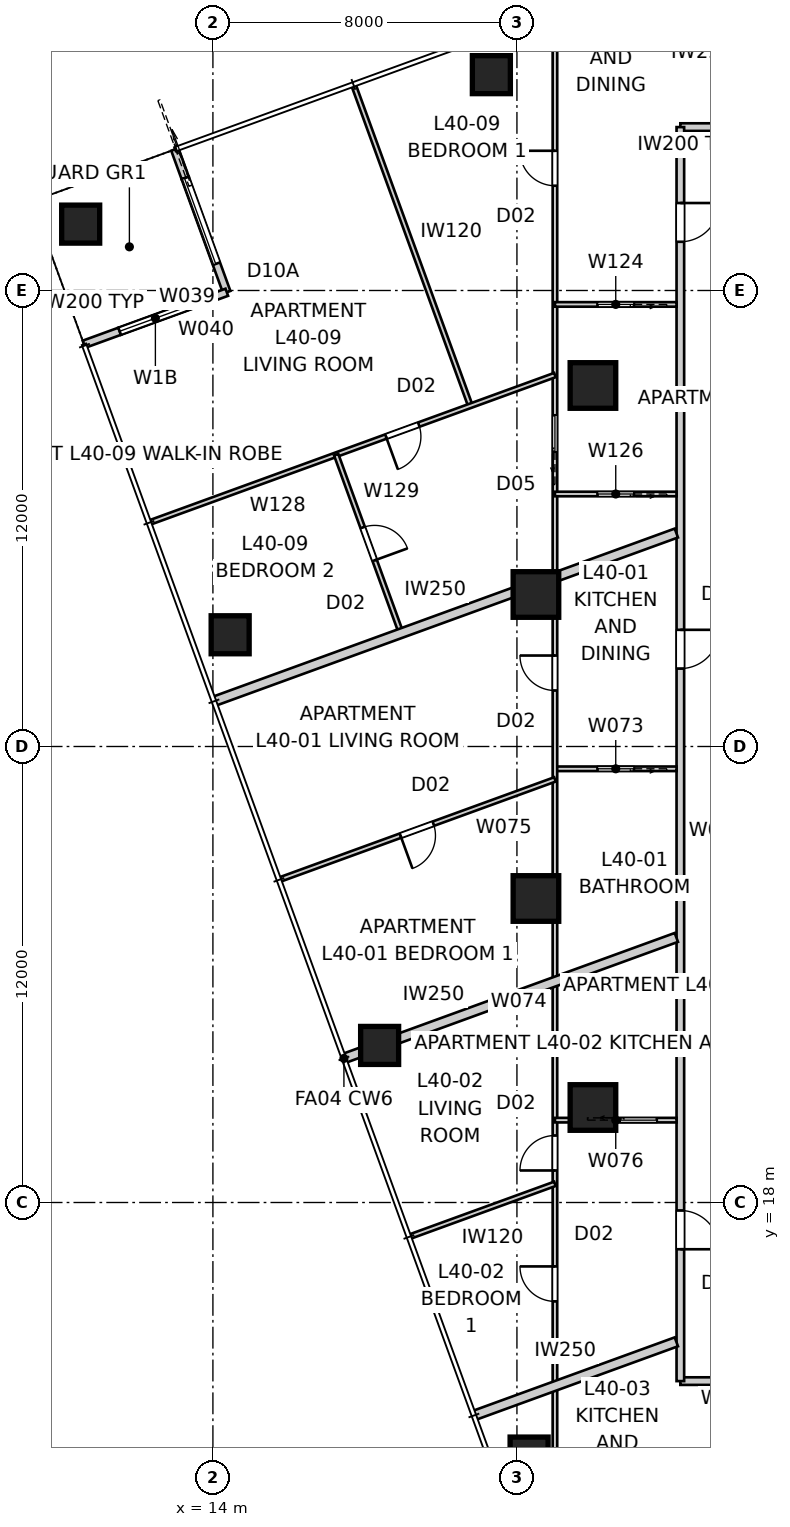
"""IFC4 building model, lengths in metres.
Left out: names, types, materials, properties, quantities, classifications, styles, units other than length and angle.
Written with IfcOpenShell. Run it as: python <this file> out.ifc"""

import sys

from ifc_helpers import new_model, si_unit, direction, frame, frame_2d, origin, origin_2d, place, context, subcontext, project, spatial, rectangle, extrude, element, fill, save


model = new_model("IFC4")
c1 = context("Model", 3, precision=1e-05, world=origin(), true_north=direction((0.0, 1.0)))
c2 = subcontext(c1, "Body", "Model", "MODEL_VIEW")
j1 = project(units=[si_unit("LENGTHUNIT", "METRE"), si_unit("PLANEANGLEUNIT", "RADIAN")], contexts=[c1])
p1 = place(None, origin())
s1 = spatial("IfcSite", under=j1, at=p1, CompositionType="ELEMENT")
p2 = place(p1, origin())
s2 = spatial("IfcBuilding", under=s1, at=p2, CompositionType="ELEMENT")
p3 = place(p2, frame((0.0, 0.0, 147.2)))
s3 = spatial("IfcBuildingStorey", under=s2, at=p3, CompositionType="ELEMENT", Elevation=147.2)
for number, where, z_axis, x_axis in (
    (1, (21.327, 47.68, 0.0), (0.0, 0.0, 1.0), (1.0, 0.0, 0.0)),
    (2, (10.521, 43.747, 0.0), (0.0, 0.0, 1.0), (1.0, 0.0, 0.0)),
    (3, (14.454, 32.94, 0.0), (0.0, 0.0, 1.0), (1.0, 0.0, 0.0)),
    (4, (18.387, 22.134, 0.0), (0.0, 0.0, 1.0), (1.0, 0.0, 0.0)),
    (5, (22.32, 11.327, 0.0), (0.0, 0.0, 1.0), (1.0, 0.0, 0.0)),
):
    element("IfcColumn", number, at=place(p3, frame(where, z_axis=z_axis, x_axis=x_axis)), inside=s3, PredefinedType="COLUMN", context=c2, shape_type="SweptSolid", body=[
        extrude(rectangle(XDim=1.0, YDim=1.0, at=origin_2d()), origin(), (0.0, 0.0, 1.0), 3.4),
    ])
for number, where, z_axis, x_axis in (
    (6, (24.0, 39.5, 0.0), (0.0, 0.0, 1.0), (1.0, 0.0, 0.0)),
    (7, (22.5, 34.0, 0.0), (0.0, 0.0, 1.0), (1.0, 0.0, 0.0)),
    (8, (22.5, 26.0, 0.0), (0.0, 0.0, 1.0), (1.0, 0.0, 0.0)),
    (9, (24.0, 20.5, 0.0), (0.0, 0.0, 1.0), (1.0, 0.0, 0.0)),
):
    element("IfcColumn", number, at=place(p3, frame(where, z_axis=z_axis, x_axis=x_axis)), inside=s3, PredefinedType="COLUMN", context=c2, shape_type="SweptSolid", body=[
        extrude(rectangle(XDim=1.2, YDim=1.2, at=origin_2d()), origin(), (0.0, 0.0, 1.0), 3.4),
    ])
p4 = place(p3, frame((12.998, 45.712, 0.0), z_axis=(0.0, 0.0, 1.0), x_axis=(0.342110593602, -0.939659694648, 0.0)))
e10 = element("IfcWall", 10, at=p4, inside=s3, PredefinedType="SOLIDWALL", context=c2, shape_type="SweptSolid", body=[
    extrude(rectangle(XDim=0.8, YDim=0.2, at=frame_2d((0.4, 0.0))), origin(), (0.0, 0.0, 1.0), 3.25),
])
p5 = place(p3, frame((13.271, 44.96, 0.0), z_axis=(0.0, 0.0, 1.0), x_axis=(0.342018703306, -0.939693144909, 0.0)))
e11 = element("IfcWall", 11, at=p5, inside=s3, PredefinedType="SOLIDWALL", context=c2, shape_type="SweptSolid", body=[
    extrude(rectangle(XDim=3.2, YDim=0.2, at=frame_2d((1.6, 0.0))), origin(), (0.0, 0.0, 1.0), 2.722),
])
p6 = place(p5, origin())
e12 = element("IfcOpeningElement", 12, at=p6, cuts=e11, PredefinedType="OPENING", context=c2, shape_type="SweptSolid", body=[
    extrude(rectangle(XDim=2.4, YDim=2.1, at=frame_2d((1.2, 1.05))), frame((0.0, 0.11, 0.0), z_axis=(0.0, -1.0, 0.0), x_axis=(1.0, 0.0, 0.0)), (0.0, 0.0, 1.0), 0.22),
])
p7 = place(p3, frame((14.366, 41.953, 0.0), z_axis=(0.0, 0.0, 1.0), x_axis=(-0.939712609717, -0.341965219194, 0.0)))
e13 = element("IfcWall", 13, at=p7, inside=s3, PredefinedType="SOLIDWALL", context=c2, shape_type="SweptSolid", body=[
    extrude(rectangle(XDim=3.0, YDim=0.2, at=frame_2d((1.5, 0.0))), origin(), (0.0, 0.0, 1.0), 2.722),
])
p8 = place(p7, frame((1.0, 0.0, 0.45)))
e14 = element("IfcOpeningElement", 14, at=p8, cuts=e13, PredefinedType="OPENING", context=c2, shape_type="SweptSolid", body=[
    extrude(rectangle(XDim=2.0, YDim=1.8, at=frame_2d((1.0, 0.9))), frame((0.0, 0.11, 0.0), z_axis=(0.0, -1.0, 0.0), x_axis=(1.0, 0.0, 0.0)), (0.0, 0.0, 1.0), 0.22),
])
p9 = place(p3, frame((11.547, 40.927, 0.0), z_axis=(0.0, 0.0, 1.0), x_axis=(-0.939686455819, -0.342037080957, 0.0)))
e15 = element("IfcWall", 15, at=p9, inside=s3, PredefinedType="SOLIDWALL", context=c2, shape_type="SweptSolid", body=[
    extrude(rectangle(XDim=1.0, YDim=0.2, at=frame_2d((0.5, 0.0))), origin(), (0.0, 0.0, 1.0), 3.25),
])
p10 = place(p3, frame((26.3, 13.3, 0.0), z_axis=(0.0, 0.0, 1.0), x_axis=(1.0, 0.0, 0.0)))
e16 = element("IfcWall", 16, at=p10, inside=s3, PredefinedType="PARTITIONING", context=c2, shape_type="SweptSolid", body=[
    extrude(rectangle(XDim=5.925, YDim=0.2, at=frame_2d((2.962, 0.0))), origin(), (0.0, 0.0, 1.0), 3.25),
])
p11 = place(p10, frame((2.545, 0.0, 0.0)))
e17 = element("IfcOpeningElement", 17, at=p11, cuts=e16, PredefinedType="OPENING", context=c2, shape_type="SweptSolid", body=[
    extrude(rectangle(XDim=1.02, YDim=2.34, at=frame_2d((0.51, 1.17))), frame((0.0, 0.11, 0.0), z_axis=(0.0, -1.0, 0.0), x_axis=(1.0, 0.0, 0.0)), (0.0, 0.0, 1.0), 0.22),
])
p12 = place(p3, frame((30.758, 46.3, 0.0), z_axis=(0.0, 0.0, 1.0), x_axis=(-1.0, 0.0, 0.0)))
e18 = element("IfcWall", 18, at=p12, inside=s3, PredefinedType="PARTITIONING", context=c2, shape_type="SweptSolid", body=[
    extrude(rectangle(XDim=4.458, YDim=0.2, at=frame_2d((2.229, 0.0))), origin(), (0.0, 0.0, 1.0), 3.25),
])
p13 = place(p3, frame((26.3, 46.3, 0.0), z_axis=(0.0, 0.0, 1.0), x_axis=(0.0, -1.0, 0.0)))
e19 = element("IfcWall", 19, at=p13, inside=s3, PredefinedType="PARTITIONING", context=c2, shape_type="SweptSolid", body=[
    extrude(rectangle(XDim=33.0, YDim=0.2, at=frame_2d((16.5, 0.0))), origin(), (0.0, 0.0, 1.0), 3.25),
])
p14 = place(p13, frame((13.229, 0.0, 0.0)))
e20 = element("IfcOpeningElement", 20, at=p14, cuts=e19, PredefinedType="OPENING", context=c2, shape_type="SweptSolid", body=[
    extrude(rectangle(XDim=1.02, YDim=2.34, at=frame_2d((0.51, 1.17))), frame((0.0, 0.11, 0.0), z_axis=(0.0, -1.0, 0.0), x_axis=(1.0, 0.0, 0.0)), (0.0, 0.0, 1.0), 0.22),
])
p15 = place(p13, frame((28.51, 0.0, 0.0)))
e21 = element("IfcOpeningElement", 21, at=p15, cuts=e19, PredefinedType="OPENING", context=c2, shape_type="SweptSolid", body=[
    extrude(rectangle(XDim=1.02, YDim=2.34, at=frame_2d((0.51, 1.17))), frame((0.0, 0.11, 0.0), z_axis=(0.0, -1.0, 0.0), x_axis=(1.0, 0.0, 0.0)), (0.0, 0.0, 1.0), 0.22),
])
p16 = place(p13, frame((1.998, 0.0, 0.0)))
e22 = element("IfcOpeningElement", 22, at=p16, cuts=e19, PredefinedType="OPENING", context=c2, shape_type="SweptSolid", body=[
    extrude(rectangle(XDim=1.02, YDim=2.34, at=frame_2d((0.51, 1.17))), frame((0.0, 0.11, 0.0), z_axis=(0.0, -1.0, 0.0), x_axis=(1.0, 0.0, 0.0)), (0.0, 0.0, 1.0), 0.22),
])
p17 = place(p3, frame((14.027, 31.188, 0.0), z_axis=(0.0, 0.0, 1.0), x_axis=(0.939692090592, 0.342021600019, 0.0)))
e23 = element("IfcWall", 23, at=p17, inside=s3, PredefinedType="PARTITIONING", context=c2, shape_type="SweptSolid", body=[
    extrude(rectangle(XDim=12.949, YDim=0.25, at=frame_2d((6.474, 0.0))), origin(), (0.0, 0.0, 1.0), 3.25),
])
p18 = place(p3, frame((17.447, 21.792, 0.0), z_axis=(0.0, 0.0, 1.0), x_axis=(0.939693071685, 0.342018904489, 0.0)))
e24 = element("IfcWall", 24, at=p18, inside=s3, PredefinedType="PARTITIONING", context=c2, shape_type="SweptSolid", body=[
    extrude(rectangle(XDim=9.309, YDim=0.25, at=frame_2d((4.654, 0.0))), origin(), (0.0, 0.0, 1.0), 3.25),
])
p19 = place(p3, frame((20.868, 12.395, 0.0), z_axis=(0.0, 0.0, 1.0), x_axis=(0.939690274876, 0.342026588591, 0.0)))
e25 = element("IfcWall", 25, at=p19, inside=s3, PredefinedType="PARTITIONING", context=c2, shape_type="SweptSolid", body=[
    extrude(rectangle(XDim=5.669, YDim=0.25, at=frame_2d((2.834, 0.0))), origin(), (0.0, 0.0, 1.0), 3.25),
])
p20 = place(p3, frame((27.093, 50.843, 0.0), z_axis=(0.0, 0.0, 1.0), x_axis=(0.342012883883, -0.939695262975, 0.0)))
e26 = element("IfcWall", 26, at=p20, inside=s3, PredefinedType="PARTITIONING", context=c2, shape_type="SweptSolid", body=[
    extrude(rectangle(XDim=4.722, YDim=0.25, at=frame_2d((2.361, 0.0))), origin(), (0.0, 0.0, 1.0), 3.25),
])
p21 = place(p3, frame((26.2, 29.413, 0.0), z_axis=(0.0, 0.0, 1.0), x_axis=(-1.0, 0.0, 0.0)))
e27 = element("IfcWall", 27, at=p21, inside=s3, PredefinedType="PARTITIONING", context=c2, shape_type="SweptSolid", body=[
    extrude(rectangle(XDim=3.2, YDim=0.12, at=frame_2d((1.6, 0.0))), origin(), (0.0, 0.0, 1.0), 3.25),
])
p22 = place(p21, frame((1.12, 0.0, 0.0)))
e28 = element("IfcOpeningElement", 28, at=p22, cuts=e27, PredefinedType="OPENING", context=c2, shape_type="SweptSolid", body=[
    extrude(rectangle(XDim=0.96, YDim=2.1, at=frame_2d((0.48, 1.05))), frame((0.0, 0.07, 0.0), z_axis=(0.0, -1.0, 0.0), x_axis=(1.0, 0.0, 0.0)), (0.0, 0.0, 1.0), 0.14),
])
p23 = place(p3, frame((23.0, 10.8, 0.0), z_axis=(0.0, 0.0, 1.0), x_axis=(0.0, 1.0, 0.0)))
e29 = element("IfcWall", 29, at=p23, inside=s3, PredefinedType="PARTITIONING", context=c2, shape_type="SweptSolid", body=[
    extrude(rectangle(XDim=38.0, YDim=0.12, at=frame_2d((19.0, 0.0))), origin(), (0.0, 0.0, 1.0), 2.55),
])
p24 = place(p23, frame((20.674, 0.0, 0.0)))
e30 = element("IfcOpeningElement", 30, at=p24, cuts=e29, PredefinedType="OPENING", context=c2, shape_type="SweptSolid", body=[
    extrude(rectangle(XDim=0.92, YDim=2.34, at=frame_2d((0.46, 1.17))), frame((0.0, 0.07, 0.0), z_axis=(0.0, -1.0, 0.0), x_axis=(1.0, 0.0, 0.0)), (0.0, 0.0, 1.0), 0.14),
])
p25 = place(p23, frame((4.598, 0.0, 0.0)))
e31 = element("IfcOpeningElement", 31, at=p25, cuts=e29, PredefinedType="OPENING", context=c2, shape_type="SweptSolid", body=[
    extrude(rectangle(XDim=0.92, YDim=2.34, at=frame_2d((0.46, 1.17))), frame((0.0, 0.07, 0.0), z_axis=(0.0, -1.0, 0.0), x_axis=(1.0, 0.0, 0.0)), (0.0, 0.0, 1.0), 0.14),
])
p26 = place(p23, frame((8.043, 0.0, 0.0)))
e32 = element("IfcOpeningElement", 32, at=p26, cuts=e29, PredefinedType="OPENING", context=c2, shape_type="SweptSolid", body=[
    extrude(rectangle(XDim=0.92, YDim=2.34, at=frame_2d((0.46, 1.17))), frame((0.0, 0.07, 0.0), z_axis=(0.0, -1.0, 0.0), x_axis=(1.0, 0.0, 0.0)), (0.0, 0.0, 1.0), 0.14),
])
p27 = place(p23, frame((33.957, 0.0, 0.0)))
e33 = element("IfcOpeningElement", 33, at=p27, cuts=e29, PredefinedType="OPENING", context=c2, shape_type="SweptSolid", body=[
    extrude(rectangle(XDim=0.92, YDim=2.34, at=frame_2d((0.46, 1.17))), frame((0.0, 0.07, 0.0), z_axis=(0.0, -1.0, 0.0), x_axis=(1.0, 0.0, 0.0)), (0.0, 0.0, 1.0), 0.14),
])
p28 = place(p23, frame((26.957, 0.0, 0.0)))
e34 = element("IfcOpeningElement", 34, at=p28, cuts=e29, PredefinedType="OPENING", context=c2, shape_type="SweptSolid", body=[
    extrude(rectangle(XDim=0.96, YDim=2.1, at=frame_2d((0.48, 1.05))), frame((0.0, 0.07, 0.0), z_axis=(0.0, -1.0, 0.0), x_axis=(1.0, 0.0, 0.0)), (0.0, 0.0, 1.0), 0.14),
])
p29 = place(p3, frame((23.0, 29.134, 0.0), z_axis=(0.0, 0.0, 1.0), x_axis=(-0.939685835373, -0.342038785519, 0.0)))
e35 = element("IfcWall", 35, at=p29, inside=s3, PredefinedType="PARTITIONING", context=c2, shape_type="SweptSolid", body=[
    extrude(rectangle(XDim=7.689, YDim=0.12, at=frame_2d((3.844, 0.0))), origin(), (0.0, 0.0, 1.0), 3.25),
])
p30 = place(p29, frame((3.404, 0.0, 0.0)))
e36 = element("IfcOpeningElement", 36, at=p30, cuts=e35, PredefinedType="OPENING", context=c2, shape_type="SweptSolid", body=[
    extrude(rectangle(XDim=0.92, YDim=2.34, at=frame_2d((0.46, 1.17))), frame((0.0, 0.07, 0.0), z_axis=(0.0, -1.0, 0.0), x_axis=(1.0, 0.0, 0.0)), (0.0, 0.0, 1.0), 0.14),
])
p31 = place(p3, frame((23.0, 20.167, 0.0), z_axis=(0.0, 0.0, 1.0), x_axis=(1.0, 0.0, 0.0)))
e37 = element("IfcWall", 37, at=p31, inside=s3, PredefinedType="PARTITIONING", context=c2, shape_type="SweptSolid", body=[
    extrude(rectangle(XDim=3.2, YDim=0.12, at=frame_2d((1.6, 0.0))), origin(), (0.0, 0.0, 1.0), 3.25),
])
p32 = place(p31, frame((1.72, 0.0, 0.0)))
e38 = element("IfcOpeningElement", 38, at=p32, cuts=e37, PredefinedType="OPENING", context=c2, shape_type="SweptSolid", body=[
    extrude(rectangle(XDim=0.96, YDim=2.1, at=frame_2d((0.48, 1.05))), frame((0.0, 0.07, 0.0), z_axis=(0.0, -1.0, 0.0), x_axis=(1.0, 0.0, 0.0)), (0.0, 0.0, 1.0), 0.14),
])
p33 = place(p3, frame((23.0, 18.492, 0.0), z_axis=(0.0, 0.0, 1.0), x_axis=(-0.939682468191, -0.342048036063, 0.0)))
e39 = element("IfcWall", 39, at=p33, inside=s3, PredefinedType="PARTITIONING", context=c2, shape_type="SweptSolid", body=[
    extrude(rectangle(XDim=4.049, YDim=0.12, at=frame_2d((2.024, 0.0))), origin(), (0.0, 0.0, 1.0), 3.25),
])
p34 = place(p3, frame((26.2, 41.634, 0.0), z_axis=(0.0, 0.0, 1.0), x_axis=(-1.0, 0.0, 0.0)))
e40 = element("IfcWall", 40, at=p34, inside=s3, PredefinedType="PARTITIONING", context=c2, shape_type="SweptSolid", body=[
    extrude(rectangle(XDim=3.2, YDim=0.12, at=frame_2d((1.6, 0.0))), origin(), (0.0, 0.0, 1.0), 3.25),
])
p35 = place(p34, frame((1.12, 0.0, 0.0)))
e41 = element("IfcOpeningElement", 41, at=p35, cuts=e40, PredefinedType="OPENING", context=c2, shape_type="SweptSolid", body=[
    extrude(rectangle(XDim=0.96, YDim=2.1, at=frame_2d((0.48, 1.05))), frame((0.0, 0.07, 0.0), z_axis=(0.0, -1.0, 0.0), x_axis=(1.0, 0.0, 0.0)), (0.0, 0.0, 1.0), 0.14),
])
p36 = place(p3, frame((26.2, 36.645, 0.0), z_axis=(0.0, 0.0, 1.0), x_axis=(-1.0, 0.0, 0.0)))
e42 = element("IfcWall", 42, at=p36, inside=s3, PredefinedType="PARTITIONING", context=c2, shape_type="SweptSolid", body=[
    extrude(rectangle(XDim=3.2, YDim=0.12, at=frame_2d((1.6, 0.0))), origin(), (0.0, 0.0, 1.0), 3.25),
])
p37 = place(p36, frame((1.12, 0.0, 0.0)))
e43 = element("IfcOpeningElement", 43, at=p37, cuts=e42, PredefinedType="OPENING", context=c2, shape_type="SweptSolid", body=[
    extrude(rectangle(XDim=0.96, YDim=2.1, at=frame_2d((0.48, 1.05))), frame((0.0, 0.07, 0.0), z_axis=(0.0, -1.0, 0.0), x_axis=(1.0, 0.0, 0.0)), (0.0, 0.0, 1.0), 0.14),
])
p38 = place(p3, frame((17.71, 47.385, 0.0), z_axis=(0.0, 0.0, 1.0), x_axis=(0.342038393654, -0.939685978009, 0.0)))
e44 = element("IfcWall", 44, at=p38, inside=s3, PredefinedType="PARTITIONING", context=c2, shape_type="SweptSolid", body=[
    extrude(rectangle(XDim=8.96, YDim=0.12, at=frame_2d((4.48, 0.0))), origin(), (0.0, 0.0, 1.0), 3.25),
])
p39 = place(p3, frame((23.0, 39.775, 0.0), z_axis=(0.0, 0.0, 1.0), x_axis=(-0.939693965364, -0.342016449105, 0.0)))
e45 = element("IfcWall", 45, at=p39, inside=s3, PredefinedType="PARTITIONING", context=c2, shape_type="SweptSolid", body=[
    extrude(rectangle(XDim=11.328, YDim=0.12, at=frame_2d((5.664, 0.0))), origin(), (0.0, 0.0, 1.0), 3.25),
])
p40 = place(p39, frame((3.812, 0.0, 0.0)))
e46 = element("IfcOpeningElement", 46, at=p40, cuts=e45, PredefinedType="OPENING", context=c2, shape_type="SweptSolid", body=[
    extrude(rectangle(XDim=0.92, YDim=2.34, at=frame_2d((0.46, 1.17))), frame((0.0, 0.07, 0.0), z_axis=(0.0, -1.0, 0.0), x_axis=(1.0, 0.0, 0.0)), (0.0, 0.0, 1.0), 0.14),
])
p41 = place(p3, frame((17.243, 37.68, 0.0), z_axis=(0.0, 0.0, 1.0), x_axis=(0.341993964619, -0.939702148643, 0.0)))
e47 = element("IfcWall", 47, at=p41, inside=s3, PredefinedType="PARTITIONING", context=c2, shape_type="SweptSolid", body=[
    extrude(rectangle(XDim=5.0, YDim=0.12, at=frame_2d((2.5, 0.0))), origin(), (0.0, 0.0, 1.0), 3.25),
])
p42 = place(p41, frame((2.04, 0.0, 0.0)))
e48 = element("IfcOpeningElement", 48, at=p42, cuts=e47, PredefinedType="OPENING", context=c2, shape_type="SweptSolid", body=[
    extrude(rectangle(XDim=0.92, YDim=2.34, at=frame_2d((0.46, 1.17))), frame((0.0, 0.07, 0.0), z_axis=(0.0, -1.0, 0.0), x_axis=(1.0, 0.0, 0.0)), (0.0, 0.0, 1.0), 0.14),
])
p43 = place(p6, origin())
e49 = element("IfcDoor", 49, at=p43, inside=s3, OperationType="SLIDING_TO_LEFT", PredefinedType="DOOR", context=c2, shape_type="SweptSolid", body=[
    extrude(rectangle(XDim=2.4, YDim=2.1, at=frame_2d((1.2, 1.05))), frame((0.0, 0.025, 0.0), z_axis=(0.0, -1.0, 0.0), x_axis=(1.0, 0.0, 0.0)), (0.0, 0.0, 1.0), 0.05),
])
fill(e12, e49)
p44 = place(p8, origin())
e50 = element("IfcWindow", 50, at=p44, inside=s3, PartitioningType="SINGLE_PANEL", PredefinedType="WINDOW", context=c2, shape_type="SweptSolid", body=[
    extrude(rectangle(XDim=2.0, YDim=1.8, at=frame_2d((1.0, 0.9))), frame((0.0, 0.03, 0.0), z_axis=(0.0, -1.0, 0.0), x_axis=(1.0, 0.0, 0.0)), (0.0, 0.0, 1.0), 0.06),
])
fill(e14, e50)
p45 = place(p14, origin())
e51 = element("IfcDoor", 51, at=p45, inside=s3, OperationType="SINGLE_SWING_LEFT", PredefinedType="DOOR", context=c2, shape_type="SweptSolid", body=[
    extrude(rectangle(XDim=1.02, YDim=2.34, at=frame_2d((0.51, 1.17))), frame((0.0, 0.025, 0.0), z_axis=(0.0, -1.0, 0.0), x_axis=(1.0, 0.0, 0.0)), (0.0, 0.0, 1.0), 0.05),
])
fill(e20, e51)
p46 = place(p15, origin())
e52 = element("IfcDoor", 52, at=p46, inside=s3, OperationType="SINGLE_SWING_RIGHT", PredefinedType="DOOR", context=c2, shape_type="SweptSolid", body=[
    extrude(rectangle(XDim=1.02, YDim=2.34, at=frame_2d((0.51, 1.17))), frame((0.0, 0.025, 0.0), z_axis=(0.0, -1.0, 0.0), x_axis=(1.0, 0.0, 0.0)), (0.0, 0.0, 1.0), 0.05),
])
fill(e21, e52)
p47 = place(p16, origin())
e53 = element("IfcDoor", 53, at=p47, inside=s3, OperationType="SINGLE_SWING_LEFT", PredefinedType="DOOR", context=c2, shape_type="SweptSolid", body=[
    extrude(rectangle(XDim=1.02, YDim=2.34, at=frame_2d((0.51, 1.17))), frame((0.0, 0.025, 0.0), z_axis=(0.0, -1.0, 0.0), x_axis=(1.0, 0.0, 0.0)), (0.0, 0.0, 1.0), 0.05),
])
fill(e22, e53)
p48 = place(p24, origin())
e54 = element("IfcDoor", 54, at=p48, inside=s3, OperationType="SINGLE_SWING_RIGHT", PredefinedType="DOOR", context=c2, shape_type="SweptSolid", body=[
    extrude(rectangle(XDim=0.92, YDim=2.34, at=frame_2d((0.46, 1.17))), frame((0.0, 0.025, 0.0), z_axis=(0.0, -1.0, 0.0), x_axis=(1.0, 0.0, 0.0)), (0.0, 0.0, 1.0), 0.05),
])
fill(e30, e54)
p49 = place(p22, origin())
e55 = element("IfcDoor", 55, at=p49, inside=s3, OperationType="SLIDING_TO_LEFT", PredefinedType="DOOR", context=c2, shape_type="SweptSolid", body=[
    extrude(rectangle(XDim=0.96, YDim=2.1, at=frame_2d((0.48, 1.05))), frame((0.0, 0.025, 0.0), z_axis=(0.0, -1.0, 0.0), x_axis=(1.0, 0.0, 0.0)), (0.0, 0.0, 1.0), 0.05),
])
fill(e28, e55)
p50 = place(p25, origin())
e56 = element("IfcDoor", 56, at=p50, inside=s3, OperationType="SINGLE_SWING_RIGHT", PredefinedType="DOOR", context=c2, shape_type="SweptSolid", body=[
    extrude(rectangle(XDim=0.92, YDim=2.34, at=frame_2d((0.46, 1.17))), frame((0.0, 0.025, 0.0), z_axis=(0.0, -1.0, 0.0), x_axis=(1.0, 0.0, 0.0)), (0.0, 0.0, 1.0), 0.05),
])
fill(e31, e56)
p51 = place(p32, origin())
e57 = element("IfcDoor", 57, at=p51, inside=s3, OperationType="SLIDING_TO_LEFT", PredefinedType="DOOR", context=c2, shape_type="SweptSolid", body=[
    extrude(rectangle(XDim=0.96, YDim=2.1, at=frame_2d((0.48, 1.05))), frame((0.0, 0.025, 0.0), z_axis=(0.0, -1.0, 0.0), x_axis=(1.0, 0.0, 0.0)), (0.0, 0.0, 1.0), 0.05),
])
fill(e38, e57)
p52 = place(p26, origin())
e58 = element("IfcDoor", 58, at=p52, inside=s3, OperationType="SINGLE_SWING_LEFT", PredefinedType="DOOR", context=c2, shape_type="SweptSolid", body=[
    extrude(rectangle(XDim=0.92, YDim=2.34, at=frame_2d((0.46, 1.17))), frame((0.0, 0.025, 0.0), z_axis=(0.0, -1.0, 0.0), x_axis=(1.0, 0.0, 0.0)), (0.0, 0.0, 1.0), 0.05),
])
fill(e32, e58)
p53 = place(p27, origin())
e59 = element("IfcDoor", 59, at=p53, inside=s3, OperationType="SINGLE_SWING_RIGHT", PredefinedType="DOOR", context=c2, shape_type="SweptSolid", body=[
    extrude(rectangle(XDim=0.92, YDim=2.34, at=frame_2d((0.46, 1.17))), frame((0.0, 0.025, 0.0), z_axis=(0.0, -1.0, 0.0), x_axis=(1.0, 0.0, 0.0)), (0.0, 0.0, 1.0), 0.05),
])
fill(e33, e59)
p54 = place(p35, origin())
e60 = element("IfcDoor", 60, at=p54, inside=s3, OperationType="SLIDING_TO_LEFT", PredefinedType="DOOR", context=c2, shape_type="SweptSolid", body=[
    extrude(rectangle(XDim=0.96, YDim=2.1, at=frame_2d((0.48, 1.05))), frame((0.0, 0.025, 0.0), z_axis=(0.0, -1.0, 0.0), x_axis=(1.0, 0.0, 0.0)), (0.0, 0.0, 1.0), 0.05),
])
fill(e41, e60)
p55 = place(p30, origin())
e61 = element("IfcDoor", 61, at=p55, inside=s3, OperationType="SINGLE_SWING_RIGHT", PredefinedType="DOOR", context=c2, shape_type="SweptSolid", body=[
    extrude(rectangle(XDim=0.92, YDim=2.34, at=frame_2d((0.46, 1.17))), frame((0.0, 0.025, 0.0), z_axis=(0.0, -1.0, 0.0), x_axis=(1.0, 0.0, 0.0)), (0.0, 0.0, 1.0), 0.05),
])
fill(e36, e61)
p56 = place(p37, origin())
e62 = element("IfcDoor", 62, at=p56, inside=s3, OperationType="SLIDING_TO_LEFT", PredefinedType="DOOR", context=c2, shape_type="SweptSolid", body=[
    extrude(rectangle(XDim=0.96, YDim=2.1, at=frame_2d((0.48, 1.05))), frame((0.0, 0.025, 0.0), z_axis=(0.0, -1.0, 0.0), x_axis=(1.0, 0.0, 0.0)), (0.0, 0.0, 1.0), 0.05),
])
fill(e43, e62)
p57 = place(p28, origin())
e63 = element("IfcDoor", 63, at=p57, inside=s3, OperationType="SLIDING_TO_LEFT", PredefinedType="DOOR", context=c2, shape_type="SweptSolid", body=[
    extrude(rectangle(XDim=0.96, YDim=2.1, at=frame_2d((0.48, 1.05))), frame((0.0, 0.025, 0.0), z_axis=(0.0, -1.0, 0.0), x_axis=(1.0, 0.0, 0.0)), (0.0, 0.0, 1.0), 0.05),
])
fill(e34, e63)
p58 = place(p42, origin())
e64 = element("IfcDoor", 64, at=p58, inside=s3, OperationType="SINGLE_SWING_RIGHT", PredefinedType="DOOR", context=c2, shape_type="SweptSolid", body=[
    extrude(rectangle(XDim=0.92, YDim=2.34, at=frame_2d((0.46, 1.17))), frame((0.0, 0.025, 0.0), z_axis=(0.0, -1.0, 0.0), x_axis=(1.0, 0.0, 0.0)), (0.0, 0.0, 1.0), 0.05),
])
fill(e48, e64)
p59 = place(p40, origin())
e65 = element("IfcDoor", 65, at=p59, inside=s3, OperationType="SINGLE_SWING_RIGHT", PredefinedType="DOOR", context=c2, shape_type="SweptSolid", body=[
    extrude(rectangle(XDim=0.92, YDim=2.34, at=frame_2d((0.46, 1.17))), frame((0.0, 0.025, 0.0), z_axis=(0.0, -1.0, 0.0), x_axis=(1.0, 0.0, 0.0)), (0.0, 0.0, 1.0), 0.05),
])
fill(e46, e65)
save(model, sys.argv[1])
